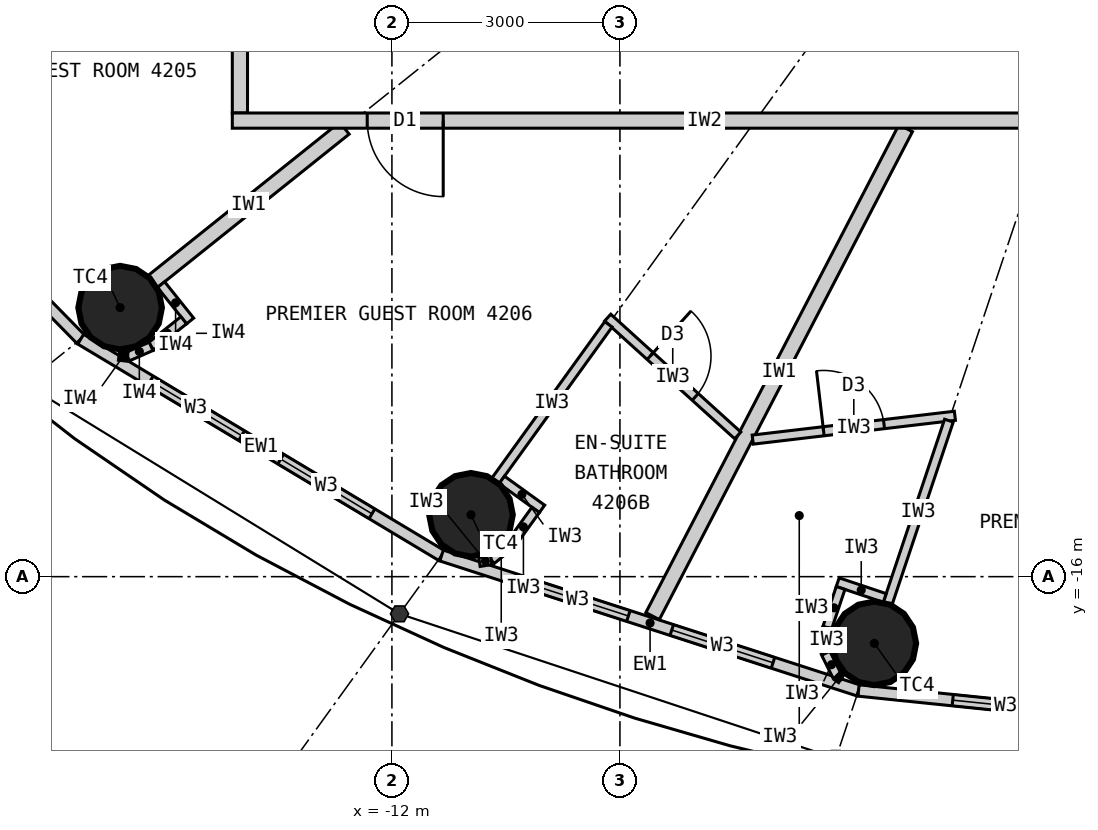
"""IFC4 building model, lengths in metres.
Left out: names, types, materials, properties, quantities, classifications, styles, units other than length and angle.
Written with IfcOpenShell. Run it as: python <this file> out.ifc"""

import sys

from ifc_helpers import new_model, si_unit, direction, frame, frame_2d, origin, origin_2d, place, context, subcontext, project, spatial, rectangle, circle, extrude, element, fill, save


model = new_model("IFC4")
c1 = context("Model", 3, precision=1e-05, world=origin(), true_north=direction((0.0, 1.0)))
c2 = subcontext(c1, "Body", "Model", "MODEL_VIEW")
j1 = project(units=[si_unit("LENGTHUNIT", "METRE"), si_unit("PLANEANGLEUNIT", "RADIAN")], contexts=[c1])
p1 = place(None, origin())
s1 = spatial("IfcSite", under=j1, at=p1, CompositionType="ELEMENT")
p2 = place(p1, origin())
s2 = spatial("IfcBuilding", under=s1, at=p2, CompositionType="ELEMENT")
p3 = place(p2, frame((0.0, 0.0, 159.9)))
s3 = spatial("IfcBuildingStorey", under=s2, at=p3, CompositionType="ELEMENT", Elevation=159.9)
for number, where, z_axis, x_axis in (
    (1, (-15.576, -12.461, 0.0), (0.0, 0.0, 1.0), (1.0, 0.0, 0.0)),
    (2, (-10.96, -15.186, 0.0), (0.0, 0.0, 1.0), (1.0, 0.0, 0.0)),
    (3, (-5.653, -16.877, 0.0), (0.0, 0.0, 1.0), (1.0, 0.0, 0.0)),
):
    element("IfcColumn", number, at=place(p3, frame(where, z_axis=z_axis, x_axis=x_axis)), inside=s3, PredefinedType="COLUMN", context=c2, shape_type="SweptSolid", body=[
        extrude(circle(Radius=0.55, at=origin_2d()), origin(), (0.0, 0.0, 1.0), 3.3),
    ])
p4 = place(p3, frame((-19.772, -9.132, 0.0), z_axis=(0.0, 0.0, 1.0), x_axis=(0.700727467776, -0.71342905457, 0.0)))
e4 = element("IfcWall", 4, at=p4, inside=s3, PredefinedType="ELEMENTEDWALL", context=c2, shape_type="SweptSolid", body=[
    extrude(rectangle(XDim=5.247, YDim=0.15, at=frame_2d((2.624, 0.0))), origin(), (0.0, 0.0, 1.0), 3.12),
])
p5 = place(p4, frame((0.924, 0.0, 0.9)))
e5 = element("IfcOpeningElement", 5, at=p5, cuts=e4, PredefinedType="OPENING", context=c2, shape_type="SweptSolid", body=[
    extrude(rectangle(XDim=1.4, YDim=1.9, at=frame_2d((0.7, 0.95))), frame((0.0, 0.085, 0.0), z_axis=(0.0, -1.0, 0.0), x_axis=(1.0, 0.0, 0.0)), (0.0, 0.0, 1.0), 0.17),
])
p6 = place(p4, frame((2.924, 0.0, 0.9)))
e6 = element("IfcOpeningElement", 6, at=p6, cuts=e4, PredefinedType="OPENING", context=c2, shape_type="SweptSolid", body=[
    extrude(rectangle(XDim=1.4, YDim=1.9, at=frame_2d((0.7, 0.95))), frame((0.0, 0.085, 0.0), z_axis=(0.0, -1.0, 0.0), x_axis=(1.0, 0.0, 0.0)), (0.0, 0.0, 1.0), 0.17),
])
p7 = place(p3, frame((-16.095, -12.876, 0.0), z_axis=(0.0, 0.0, 1.0), x_axis=(0.857695199231, -0.514158482587, 0.0)))
e7 = element("IfcWall", 7, at=p7, inside=s3, PredefinedType="ELEMENTEDWALL", context=c2, shape_type="SweptSolid", body=[
    extrude(rectangle(XDim=5.536, YDim=0.15, at=frame_2d((2.768, 0.0))), origin(), (0.0, 0.0, 1.0), 3.12),
])
p8 = place(p7, frame((1.068, 0.0, 0.9)))
e8 = element("IfcOpeningElement", 8, at=p8, cuts=e7, PredefinedType="OPENING", context=c2, shape_type="SweptSolid", body=[
    extrude(rectangle(XDim=1.4, YDim=1.9, at=frame_2d((0.7, 0.95))), frame((0.0, 0.085, 0.0), z_axis=(0.0, -1.0, 0.0), x_axis=(1.0, 0.0, 0.0)), (0.0, 0.0, 1.0), 0.17),
])
p9 = place(p7, frame((3.068, 0.0, 0.9)))
e9 = element("IfcOpeningElement", 9, at=p9, cuts=e7, PredefinedType="OPENING", context=c2, shape_type="SweptSolid", body=[
    extrude(rectangle(XDim=1.4, YDim=1.9, at=frame_2d((0.7, 0.95))), frame((0.0, 0.085, 0.0), z_axis=(0.0, -1.0, 0.0), x_axis=(1.0, 0.0, 0.0)), (0.0, 0.0, 1.0), 0.17),
])
p10 = place(p3, frame((-11.346, -15.722, 0.0), z_axis=(0.0, 0.0, 1.0), x_axis=(0.951432482129, -0.307857486429, 0.0)))
e10 = element("IfcWall", 10, at=p10, inside=s3, PredefinedType="ELEMENTEDWALL", context=c2, shape_type="SweptSolid", body=[
    extrude(rectangle(XDim=5.766, YDim=0.15, at=frame_2d((2.883, 0.0))), origin(), (0.0, 0.0, 1.0), 3.12),
])
p11 = place(p10, frame((1.183, 0.0, 0.9)))
e11 = element("IfcOpeningElement", 11, at=p11, cuts=e10, PredefinedType="OPENING", context=c2, shape_type="SweptSolid", body=[
    extrude(rectangle(XDim=1.4, YDim=1.9, at=frame_2d((0.7, 0.95))), frame((0.0, 0.085, 0.0), z_axis=(0.0, -1.0, 0.0), x_axis=(1.0, 0.0, 0.0)), (0.0, 0.0, 1.0), 0.17),
])
p12 = place(p10, frame((3.183, 0.0, 0.9)))
e12 = element("IfcOpeningElement", 12, at=p12, cuts=e10, PredefinedType="OPENING", context=c2, shape_type="SweptSolid", body=[
    extrude(rectangle(XDim=1.4, YDim=1.9, at=frame_2d((0.7, 0.95))), frame((0.0, 0.085, 0.0), z_axis=(0.0, -1.0, 0.0), x_axis=(1.0, 0.0, 0.0)), (0.0, 0.0, 1.0), 0.17),
])
p13 = place(p3, frame((-5.86, -17.497, 0.0), z_axis=(0.0, 0.0, 1.0), x_axis=(0.994751738032, -0.102318032045, 0.0)))
e13 = element("IfcWall", 13, at=p13, inside=s3, PredefinedType="ELEMENTEDWALL", context=c2, shape_type="SweptSolid", body=[
    extrude(rectangle(XDim=5.891, YDim=0.15, at=frame_2d((2.946, 0.0))), origin(), (0.0, 0.0, 1.0), 3.12),
])
p14 = place(p13, frame((1.246, 0.0, 0.9)))
e14 = element("IfcOpeningElement", 14, at=p14, cuts=e13, PredefinedType="OPENING", context=c2, shape_type="SweptSolid", body=[
    extrude(rectangle(XDim=1.4, YDim=1.9, at=frame_2d((0.7, 0.95))), frame((0.0, 0.085, 0.0), z_axis=(0.0, -1.0, 0.0), x_axis=(1.0, 0.0, 0.0)), (0.0, 0.0, 1.0), 0.17),
])
p15 = place(p13, frame((3.246, 0.0, 0.9)))
e15 = element("IfcOpeningElement", 15, at=p15, cuts=e13, PredefinedType="OPENING", context=c2, shape_type="SweptSolid", body=[
    extrude(rectangle(XDim=1.4, YDim=1.9, at=frame_2d((0.7, 0.95))), frame((0.0, 0.085, 0.0), z_axis=(0.0, -1.0, 0.0), x_axis=(1.0, 0.0, 0.0)), (0.0, 0.0, 1.0), 0.17),
])
p16 = place(p3, frame((-12.625, -10.1, 0.0), z_axis=(0.0, 0.0, 1.0), x_axis=(-0.780876185034, -0.624685827954, 0.0)))
e16 = element("IfcWall", 16, at=p16, inside=s3, PredefinedType="PARTITIONING", context=c2, shape_type="SweptSolid", body=[
    extrude(rectangle(XDim=3.229, YDim=0.2, at=frame_2d((1.615, 0.0))), origin(), (0.0, 0.0, 1.0), 2.42),
])
p17 = place(p3, frame((-5.24, -10.1, 0.0), z_axis=(0.0, 0.0, 1.0), x_axis=(-0.460532965373, -0.887642601391, 0.0)))
e17 = element("IfcWall", 17, at=p17, inside=s3, PredefinedType="PARTITIONING", context=c2, shape_type="SweptSolid", body=[
    extrude(rectangle(XDim=7.231, YDim=0.2, at=frame_2d((3.616, 0.0))), origin(), (0.0, 0.0, 1.0), 3.12),
])
p18 = place(p3, frame((-7.45, -14.142, 0.0), z_axis=(0.0, 0.0, 1.0), x_axis=(-0.74113984586, 0.671350675041, 0.0)))
e18 = element("IfcWall", 18, at=p18, inside=s3, PredefinedType="PARTITIONING", context=c2, shape_type="SweptSolid", body=[
    extrude(rectangle(XDim=2.309, YDim=0.12, at=frame_2d((1.154, 0.0))), origin(), (0.0, 0.0, 1.0), 3.12),
])
p19 = place(p18, frame((0.754, 0.0, 0.0)))
e19 = element("IfcOpeningElement", 19, at=p19, cuts=e18, PredefinedType="OPENING", context=c2, shape_type="SweptSolid", body=[
    extrude(rectangle(XDim=0.8, YDim=2.1, at=frame_2d((0.4, 1.05))), frame((0.0, 0.07, 0.0), z_axis=(0.0, -1.0, 0.0), x_axis=(1.0, 0.0, 0.0)), (0.0, 0.0, 1.0), 0.14),
])
p20 = place(p3, frame((-9.151, -12.681, 0.0), z_axis=(0.0, 0.0, 1.0), x_axis=(-0.585258912334, -0.8108464747, 0.0)))
e20 = element("IfcWall", 20, at=p20, inside=s3, PredefinedType="PARTITIONING", context=c2, shape_type="SweptSolid", body=[
    extrude(rectangle(XDim=2.54, YDim=0.12, at=frame_2d((1.27, 0.0))), origin(), (0.0, 0.0, 1.0), 2.42),
])
p21 = place(p3, frame((-10.554, -14.727, 0.0), z_axis=(0.0, 0.0, 1.0), x_axis=(0.811044231224, -0.584984833135, 0.0)))
e21 = element("IfcWall", 21, at=p21, inside=s3, PredefinedType="PARTITIONING", context=c2, shape_type="SweptSolid", body=[
    extrude(rectangle(XDim=0.652, YDim=0.12, at=frame_2d((0.326, 0.0))), origin(), (0.0, 0.0, 1.0), 3.12),
])
p22 = place(p3, frame((-10.109, -15.122, 0.0), z_axis=(0.0, 0.0, 1.0), x_axis=(-0.585344718358, -0.810784534072, 0.0)))
e22 = element("IfcWall", 22, at=p22, inside=s3, PredefinedType="PARTITIONING", context=c2, shape_type="SweptSolid", body=[
    extrude(rectangle(XDim=0.55, YDim=0.12, at=frame_2d((0.275, 0.0))), origin(), (0.0, 0.0, 1.0), 3.12),
])
p23 = place(p3, frame((-10.431, -15.568, 0.0), z_axis=(0.0, 0.0, 1.0), x_axis=(-0.77505137267, -0.631898227345, 0.0)))
e23 = element("IfcWall", 23, at=p23, inside=s3, PredefinedType="PARTITIONING", context=c2, shape_type="SweptSolid", body=[
    extrude(rectangle(XDim=0.338, YDim=0.12, at=frame_2d((0.169, 0.0))), origin(), (0.0, 0.0, 1.0), 3.12),
])
p24 = place(p3, frame((-10.693, -15.781, 0.0), z_axis=(0.0, 0.0, 1.0), x_axis=(-0.987256785332, -0.159135287777, 0.0)))
e24 = element("IfcWall", 24, at=p24, inside=s3, PredefinedType="PARTITIONING", context=c2, shape_type="SweptSolid", body=[
    extrude(rectangle(XDim=0.158, YDim=0.12, at=frame_2d((0.079, 0.0))), origin(), (0.0, 0.0, 1.0), 3.12),
])
p25 = place(p3, frame((-7.253, -14.197, 0.0), z_axis=(0.0, 0.0, 1.0), x_axis=(0.993128188393, 0.117031625725, 0.0)))
e25 = element("IfcWall", 25, at=p25, inside=s3, PredefinedType="PARTITIONING", context=c2, shape_type="SweptSolid", body=[
    extrude(rectangle(XDim=2.678, YDim=0.12, at=frame_2d((1.339, 0.0))), origin(), (0.0, 0.0, 1.0), 3.12),
])
p26 = place(p25, frame((0.939, 0.0, 0.0)))
e26 = element("IfcOpeningElement", 26, at=p26, cuts=e25, PredefinedType="OPENING", context=c2, shape_type="SweptSolid", body=[
    extrude(rectangle(XDim=0.8, YDim=2.1, at=frame_2d((0.4, 1.05))), frame((0.0, 0.07, 0.0), z_axis=(0.0, -1.0, 0.0), x_axis=(1.0, 0.0, 0.0)), (0.0, 0.0, 1.0), 0.14),
])
p27 = place(p3, frame((-4.671, -13.948, 0.0), z_axis=(0.0, 0.0, 1.0), x_axis=(-0.317669167093, -0.948201613729, 0.0)))
e27 = element("IfcWall", 27, at=p27, inside=s3, PredefinedType="PARTITIONING", context=c2, shape_type="SweptSolid", body=[
    extrude(rectangle(XDim=2.54, YDim=0.12, at=frame_2d((1.27, 0.0))), origin(), (0.0, 0.0, 1.0), 2.42),
])
p28 = place(p3, frame((-5.516, -16.28, 0.0), z_axis=(0.0, 0.0, 1.0), x_axis=(-0.948157944392, 0.317799484717, 0.0)))
e28 = element("IfcWall", 28, at=p28, inside=s3, PredefinedType="PARTITIONING", context=c2, shape_type="SweptSolid", body=[
    extrude(rectangle(XDim=0.652, YDim=0.12, at=frame_2d((0.326, 0.0))), origin(), (0.0, 0.0, 1.0), 3.12),
])
p29 = place(p3, frame((-6.097, -16.149, 0.0), z_axis=(0.0, 0.0, 1.0), x_axis=(-0.317292604854, -0.948327687514, 0.0)))
e29 = element("IfcWall", 29, at=p29, inside=s3, PredefinedType="PARTITIONING", context=c2, shape_type="SweptSolid", body=[
    extrude(rectangle(XDim=0.55, YDim=0.12, at=frame_2d((0.275, 0.0))), origin(), (0.0, 0.0, 1.0), 3.12),
])
for number, where, z_axis, x_axis in (
    (30, (-6.271, -16.67, 0.0), (0.0, 0.0, 1.0), (-0.061, -0.998, 0.0)),
    (31, (-6.292, -17.007, 0.0), (0.0, 0.0, 1.0), (0.445, -0.895, 0.0)),
):
    element("IfcWall", number, at=place(p3, frame(where, z_axis=z_axis, x_axis=x_axis)), inside=s3, PredefinedType="PARTITIONING", context=c2, shape_type="SweptSolid", body=[
        extrude(rectangle(XDim=0.338, YDim=0.12, at=frame_2d((0.169, 0.0))), origin(), (0.0, 0.0, 1.0), 3.12),
    ])
p30 = place(p3, frame((-6.142, -17.31, 0.0), z_axis=(0.0, 0.0, 1.0), x_axis=(0.835039693181, -0.550189704386, 0.0)))
e32 = element("IfcWall", 32, at=p30, inside=s3, PredefinedType="PARTITIONING", context=c2, shape_type="SweptSolid", body=[
    extrude(rectangle(XDim=0.062, YDim=0.12, at=frame_2d((0.031, 0.0))), origin(), (0.0, 0.0, 1.0), 3.12),
])
p31 = place(p3, frame((-14.0, -1.67, 0.0), z_axis=(0.0, 0.0, 1.0), x_axis=(0.0, -1.0, 0.0)))
e33 = element("IfcWall", 33, at=p31, inside=s3, PredefinedType="PARTITIONING", context=c2, shape_type="SweptSolid", body=[
    extrude(rectangle(XDim=8.23, YDim=0.2, at=frame_2d((4.115, 0.0))), origin(), (0.0, 0.0, 1.0), 3.12),
])
p32 = place(p31, frame((5.552, 0.0, 0.0)))
e34 = element("IfcOpeningElement", 34, at=p32, cuts=e33, PredefinedType="OPENING", context=c2, shape_type="SweptSolid", body=[
    extrude(rectangle(XDim=1.0, YDim=2.2, at=frame_2d((0.5, 1.1))), frame((0.0, 0.11, 0.0), z_axis=(0.0, -1.0, 0.0), x_axis=(1.0, 0.0, 0.0)), (0.0, 0.0, 1.0), 0.22),
])
p33 = place(p3, frame((-1.67, -10.0, 0.0), z_axis=(0.0, 0.0, 1.0), x_axis=(-1.0, 0.0, 0.0)))
e35 = element("IfcWall", 35, at=p33, inside=s3, PredefinedType="PARTITIONING", context=c2, shape_type="SweptSolid", body=[
    extrude(rectangle(XDim=12.43, YDim=0.2, at=frame_2d((6.215, 0.0))), origin(), (0.0, 0.0, 1.0), 3.12),
])
p34 = place(p33, frame((9.655, 0.0, 0.0)))
e36 = element("IfcOpeningElement", 36, at=p34, cuts=e35, PredefinedType="OPENING", context=c2, shape_type="SweptSolid", body=[
    extrude(rectangle(XDim=1.0, YDim=2.2, at=frame_2d((0.5, 1.1))), frame((0.0, 0.11, 0.0), z_axis=(0.0, -1.0, 0.0), x_axis=(1.0, 0.0, 0.0)), (0.0, 0.0, 1.0), 0.22),
])
p35 = place(p3, frame((-15.037, -12.158, 0.0), z_axis=(0.0, 0.0, 1.0), x_axis=(0.624840920722, -0.78075208856, 0.0)))
e37 = element("IfcWall", 37, at=p35, inside=s3, PredefinedType="PARTITIONING", context=c2, shape_type="SweptSolid", body=[
    extrude(rectangle(XDim=0.612, YDim=0.12, at=frame_2d((0.306, 0.0))), origin(), (0.0, 0.0, 1.0), 3.12),
])
p36 = place(p3, frame((-14.739, -12.627, 0.0), z_axis=(0.0, 0.0, 1.0), x_axis=(-0.780912119987, -0.624640905527, 0.0)))
e38 = element("IfcWall", 38, at=p36, inside=s3, PredefinedType="PARTITIONING", context=c2, shape_type="SweptSolid", body=[
    extrude(rectangle(XDim=0.55, YDim=0.12, at=frame_2d((0.275, 0.0))), origin(), (0.0, 0.0, 1.0), 3.12),
])
p37 = place(p3, frame((-15.169, -12.97, 0.0), z_axis=(0.0, 0.0, 1.0), x_axis=(-0.915974725257, -0.401235968838, 0.0)))
e39 = element("IfcWall", 39, at=p37, inside=s3, PredefinedType="PARTITIONING", context=c2, shape_type="SweptSolid", body=[
    extrude(rectangle(XDim=0.338, YDim=0.12, at=frame_2d((0.169, 0.0))), origin(), (0.0, 0.0, 1.0), 3.12),
])
p38 = place(p3, frame((-15.478, -13.106, 0.0), z_axis=(0.0, 0.0, 1.0), x_axis=(-0.993778813557, 0.111371763588, 0.0)))
e40 = element("IfcWall", 40, at=p38, inside=s3, PredefinedType="PARTITIONING", context=c2, shape_type="SweptSolid", body=[
    extrude(rectangle(XDim=0.114, YDim=0.12, at=frame_2d((0.057, 0.0))), origin(), (0.0, 0.0, 1.0), 3.12),
])
p39 = place(p8, origin())
e41 = element("IfcWindow", 41, at=p39, inside=s3, PartitioningType="SINGLE_PANEL", PredefinedType="WINDOW", context=c2, shape_type="SweptSolid", body=[
    extrude(rectangle(XDim=1.4, YDim=1.9, at=frame_2d((0.7, 0.95))), frame((0.0, 0.03, 0.0), z_axis=(0.0, -1.0, 0.0), x_axis=(1.0, 0.0, 0.0)), (0.0, 0.0, 1.0), 0.06),
])
fill(e8, e41)
p40 = place(p9, origin())
e42 = element("IfcWindow", 42, at=p40, inside=s3, PartitioningType="SINGLE_PANEL", PredefinedType="WINDOW", context=c2, shape_type="SweptSolid", body=[
    extrude(rectangle(XDim=1.4, YDim=1.9, at=frame_2d((0.7, 0.95))), frame((0.0, 0.03, 0.0), z_axis=(0.0, -1.0, 0.0), x_axis=(1.0, 0.0, 0.0)), (0.0, 0.0, 1.0), 0.06),
])
fill(e9, e42)
p41 = place(p11, origin())
e43 = element("IfcWindow", 43, at=p41, inside=s3, PartitioningType="SINGLE_PANEL", PredefinedType="WINDOW", context=c2, shape_type="SweptSolid", body=[
    extrude(rectangle(XDim=1.4, YDim=1.9, at=frame_2d((0.7, 0.95))), frame((0.0, 0.03, 0.0), z_axis=(0.0, -1.0, 0.0), x_axis=(1.0, 0.0, 0.0)), (0.0, 0.0, 1.0), 0.06),
])
fill(e11, e43)
p42 = place(p12, origin())
e44 = element("IfcWindow", 44, at=p42, inside=s3, PartitioningType="SINGLE_PANEL", PredefinedType="WINDOW", context=c2, shape_type="SweptSolid", body=[
    extrude(rectangle(XDim=1.4, YDim=1.9, at=frame_2d((0.7, 0.95))), frame((0.0, 0.03, 0.0), z_axis=(0.0, -1.0, 0.0), x_axis=(1.0, 0.0, 0.0)), (0.0, 0.0, 1.0), 0.06),
])
fill(e12, e44)
p43 = place(p14, origin())
e45 = element("IfcWindow", 45, at=p43, inside=s3, PartitioningType="SINGLE_PANEL", PredefinedType="WINDOW", context=c2, shape_type="SweptSolid", body=[
    extrude(rectangle(XDim=1.4, YDim=1.9, at=frame_2d((0.7, 0.95))), frame((0.0, 0.03, 0.0), z_axis=(0.0, -1.0, 0.0), x_axis=(1.0, 0.0, 0.0)), (0.0, 0.0, 1.0), 0.06),
])
fill(e14, e45)
p44 = place(p19, origin())
e46 = element("IfcDoor", 46, at=p44, inside=s3, OperationType="SINGLE_SWING_RIGHT", PredefinedType="DOOR", context=c2, shape_type="SweptSolid", body=[
    extrude(rectangle(XDim=0.8, YDim=2.1, at=frame_2d((0.4, 1.05))), frame((0.0, 0.025, 0.0), z_axis=(0.0, -1.0, 0.0), x_axis=(1.0, 0.0, 0.0)), (0.0, 0.0, 1.0), 0.05),
])
fill(e19, e46)
p45 = place(p34, origin())
e47 = element("IfcDoor", 47, at=p45, inside=s3, OperationType="SINGLE_SWING_LEFT", PredefinedType="DOOR", context=c2, shape_type="SweptSolid", body=[
    extrude(rectangle(XDim=1.0, YDim=2.2, at=frame_2d((0.5, 1.1))), frame((0.0, 0.025, 0.0), z_axis=(0.0, -1.0, 0.0), x_axis=(1.0, 0.0, 0.0)), (0.0, 0.0, 1.0), 0.05),
])
fill(e36, e47)
p46 = place(p26, origin())
e48 = element("IfcDoor", 48, at=p46, inside=s3, OperationType="SINGLE_SWING_LEFT", PredefinedType="DOOR", context=c2, shape_type="SweptSolid", body=[
    extrude(rectangle(XDim=0.8, YDim=2.1, at=frame_2d((0.4, 1.05))), frame((0.0, 0.025, 0.0), z_axis=(0.0, -1.0, 0.0), x_axis=(1.0, 0.0, 0.0)), (0.0, 0.0, 1.0), 0.05),
])
fill(e26, e48)
save(model, sys.argv[1])
